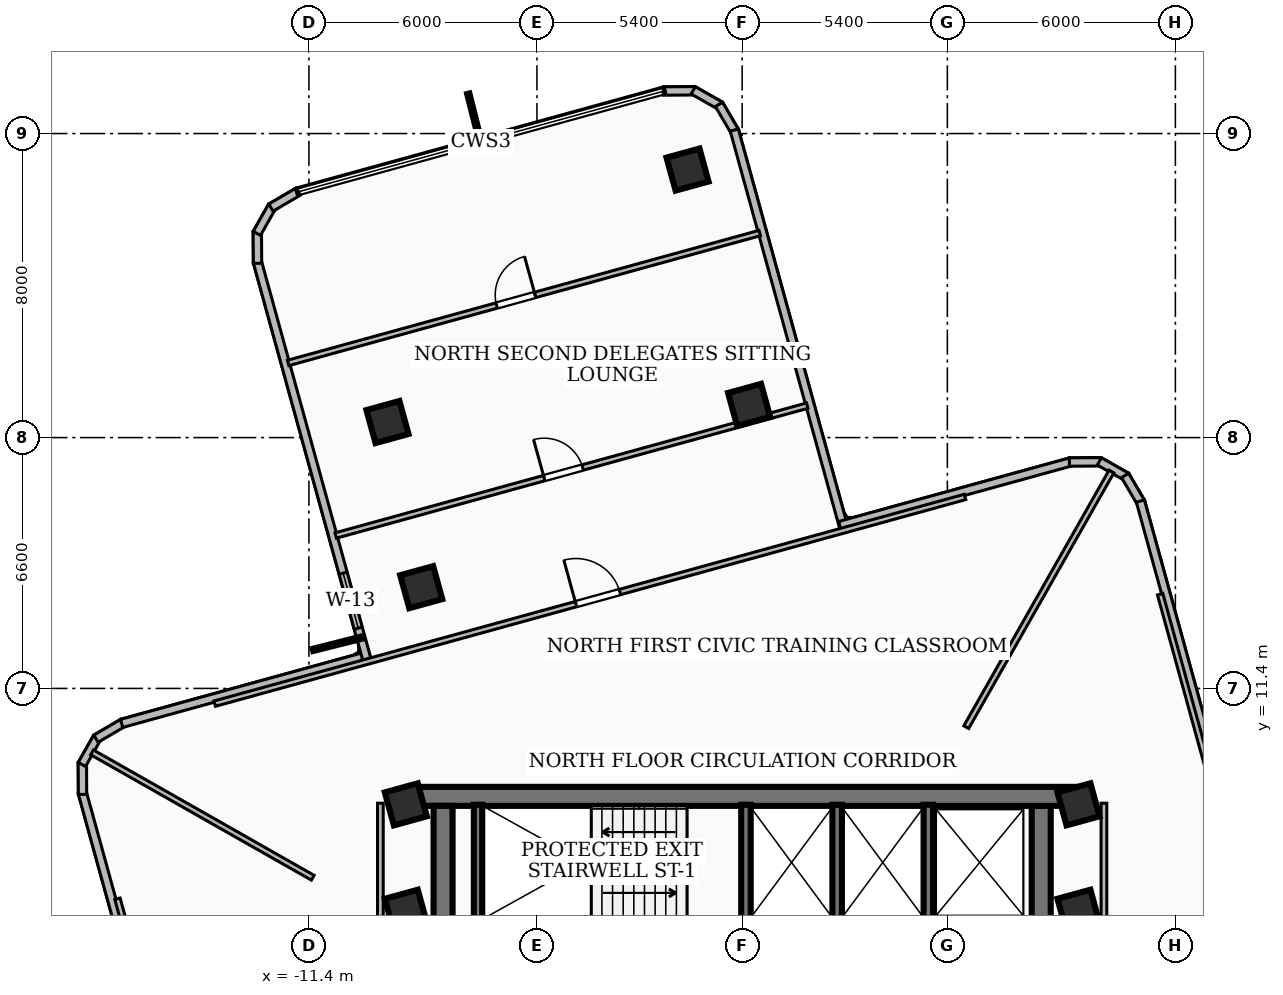
"""IFC4 building model, lengths in metres.
Left out: names, types, materials, properties, quantities, classifications, styles, units other than length and angle.
Written with IfcOpenShell. Run it as: python <this file> out.ifc"""

import sys

from ifc_helpers import new_model, si_unit, direction, frame, frame_2d, origin, origin_2d, place, context, subcontext, project, spatial, rectangle, extrude, element, fill, save


model = new_model("IFC4")
c1 = context("Model", 3, precision=1e-05, world=origin(), true_north=direction((0.0, 1.0)))
c2 = subcontext(c1, "Body", "Model", "MODEL_VIEW")
j1 = project(units=[si_unit("LENGTHUNIT", "METRE"), si_unit("PLANEANGLEUNIT", "RADIAN")], contexts=[c1])
p1 = place(None, origin())
s1 = spatial("IfcSite", under=j1, at=p1, CompositionType="ELEMENT")
p2 = place(p1, origin())
s2 = spatial("IfcBuilding", under=s1, at=p2, CompositionType="ELEMENT")
p3 = place(p2, frame((0.0, 0.0, 134.28)))
s3 = spatial("IfcBuildingStorey", under=s2, at=p3, CompositionType="ELEMENT", Elevation=134.28)
p4 = place(p3, frame((-8.78, 8.56, 0.0), z_axis=(0.0, 0.0, 1.0), x_axis=(1.0, 0.0, 0.0)))
e1 = element("IfcWall", 1, at=p4, inside=s3, PredefinedType="SHEAR", context=c2, shape_type="SweptSolid", body=[
    extrude(rectangle(XDim=17.56, YDim=0.5, at=frame_2d((8.78, 0.0))), origin(), (0.0, 0.0, 1.0), 3.32),
])
for number, where, z_axis, x_axis in (
    (2, (-7.87, 2.0, 0.0), (0.0, 0.0, 1.0), (0.0, 1.0, 0.0)),
    (3, (7.87, 8.31, 0.0), (0.0, 0.0, 1.0), (0.0, -1.0, 0.0)),
):
    element("IfcWall", number, at=place(p3, frame(where, z_axis=z_axis, x_axis=x_axis)), inside=s3, PredefinedType="SHEAR", context=c2, shape_type="SweptSolid", body=[
        extrude(rectangle(XDim=6.31, YDim=0.5, at=frame_2d((3.155, 0.0))), origin(), (0.0, 0.0, 1.0), 3.32),
    ])
p5 = place(p3, frame((-6.95, 5.28, 0.0), z_axis=(0.0, 0.0, 1.0), x_axis=(0.0, 1.0, 0.0)))
e4 = element("IfcWall", 4, at=p5, inside=s3, PredefinedType="SOLIDWALL", context=c2, shape_type="SweptSolid", body=[
    extrude(rectangle(XDim=3.06, YDim=0.22, at=frame_2d((1.53, 0.0))), origin(), (0.0, 0.0, 1.0), 3.32),
])
for number, where, z_axis, x_axis in (
    (5, (0.1, 5.3, 0.0), (0.0, 0.0, 1.0), (0.0, 1.0, 0.0)),
    (6, (2.5, 5.3, 0.0), (0.0, 0.0, 1.0), (0.0, 1.0, 0.0)),
    (7, (4.9, 5.3, 0.0), (0.0, 0.0, 1.0), (0.0, 1.0, 0.0)),
):
    element("IfcWall", number, at=place(p3, frame(where, z_axis=z_axis, x_axis=x_axis)), inside=s3, PredefinedType="SOLIDWALL", context=c2, shape_type="SweptSolid", body=[
        extrude(rectangle(XDim=3.04, YDim=0.25, at=frame_2d((1.52, 0.0))), origin(), (0.0, 0.0, 1.0), 3.32),
    ])
for number, where, z_axis, x_axis in (
    (8, (-8.85, 5.55, 0.0), (0.0, 0.0, 1.0), (0.964, 0.266, 0.0)),
    (9, (8.85, 5.55, 0.0), (0.0, 0.0, 1.0), (0.964, 0.266, 0.0)),
    (10, (-8.85, 8.35, 0.0), (0.0, 0.0, 1.0), (0.964, 0.266, 0.0)),
    (11, (8.85, 8.35, 0.0), (0.0, 0.0, 1.0), (0.964, 0.266, 0.0)),
    (12, (0.183, 18.86, 0.0), (0.0, 0.0, 1.0), (0.964, 0.266, 0.0)),
    (13, (-8.445, 14.064, 0.0), (0.0, 0.0, 1.0), (0.964, 0.266, 0.0)),
    (14, (-1.437, 25.052, 0.0), (0.0, 0.0, 1.0), (0.964, 0.266, 0.0)),
    (15, (-9.333, 18.409, 0.0), (0.0, 0.0, 1.0), (0.964, 0.266, 0.0)),
):
    element("IfcColumn", number, at=place(p3, frame(where, z_axis=z_axis, x_axis=x_axis)), inside=s3, PredefinedType="COLUMN", context=c2, shape_type="SweptSolid", body=[
        extrude(rectangle(XDim=0.9, YDim=0.9, at=origin_2d()), origin(), (0.0, 0.0, 1.0), 3.6),
    ])
p6 = place(p3, frame((-15.686, 2.568, 0.0), z_axis=(0.0, 0.0, 1.0), x_axis=(-0.265558779784, 0.964094670911, 0.0)))
e16 = element("IfcWall", 16, at=p6, inside=s3, PredefinedType="SOLIDWALL", context=c2, shape_type="SweptSolid", body=[
    extrude(rectangle(XDim=6.319, YDim=0.22, at=frame_2d((3.159, 0.0))), origin(), (0.0, 0.0, 1.0), 3.32),
])
p7 = place(p3, frame((-17.357, 8.611, 0.0), z_axis=(0.0, 0.0, 1.0), x_axis=(-0.006140235123, 0.999981148579, 0.0)))
e17 = element("IfcWall", 17, at=p7, inside=s3, PredefinedType="SOLIDWALL", context=c2, shape_type="SweptSolid", body=[
    extrude(rectangle(XDim=0.835, YDim=0.22, at=frame_2d((0.417, 0.0))), origin(), (0.0, 0.0, 1.0), 3.32),
])
p8 = place(p3, frame((-17.374, 9.399, 0.0), z_axis=(0.0, 0.0, 1.0), x_axis=(0.492959963164, 0.87005199541, 0.0)))
e18 = element("IfcWall", 18, at=p8, inside=s3, PredefinedType="SOLIDWALL", context=c2, shape_type="SweptSolid", body=[
    extrude(rectangle(XDim=0.82, YDim=0.22, at=frame_2d((0.41, 0.0))), origin(), (0.0, 0.0, 1.0), 3.32),
])
p9 = place(p3, frame((-17.004, 10.077, 0.0), z_axis=(0.0, 0.0, 1.0), x_axis=(0.862662761192, 0.505779557172, 0.0)))
e19 = element("IfcWall", 19, at=p9, inside=s3, PredefinedType="SOLIDWALL", context=c2, shape_type="SweptSolid", body=[
    extrude(rectangle(XDim=0.834, YDim=0.22, at=frame_2d((0.417, 0.0))), origin(), (0.0, 0.0, 1.0), 3.32),
])
p10 = place(p3, frame((-16.33, 10.479, 0.0), z_axis=(0.0, 0.0, 1.0), x_axis=(0.964092175021, 0.265567840793, 0.0)))
e20 = element("IfcWall", 20, at=p10, inside=s3, PredefinedType="SOLIDWALL", context=c2, shape_type="SweptSolid", body=[
    extrude(rectangle(XDim=6.759, YDim=0.22, at=frame_2d((3.379, 0.0))), origin(), (0.0, 0.0, 1.0), 3.32),
])
p11 = place(p3, frame((-9.876, 12.166, 0.0), z_axis=(0.0, 0.0, 1.0), x_axis=(-0.265506061674, 0.964109190504, 0.0)))
e21 = element("IfcWall", 21, at=p11, inside=s3, PredefinedType="SOLIDWALL", context=c2, shape_type="SweptSolid", body=[
    extrude(rectangle(XDim=10.859, YDim=0.22, at=frame_2d((5.429, 0.0))), origin(), (0.0, 0.0, 1.0), 3.32),
])
p12 = place(p11, frame((0.85, 0.0, 0.85)))
e22 = element("IfcOpeningElement", 22, at=p12, cuts=e21, PredefinedType="OPENING", context=c2, shape_type="SweptSolid", body=[
    extrude(rectangle(XDim=1.5, YDim=1.8, at=frame_2d((0.75, 0.9))), frame((0.0, 0.12, 0.0), z_axis=(0.0, -1.0, 0.0), x_axis=(1.0, 0.0, 0.0)), (0.0, 0.0, 1.0), 0.24),
])
p13 = place(p3, frame((-12.752, 22.586, 0.0), z_axis=(0.0, 0.0, 1.0), x_axis=(-0.007318305188, 0.999973220846, 0.0)))
e23 = element("IfcWall", 23, at=p13, inside=s3, PredefinedType="SOLIDWALL", context=c2, shape_type="SweptSolid", body=[
    extrude(rectangle(XDim=0.834, YDim=0.22, at=frame_2d((0.417, 0.0))), origin(), (0.0, 0.0, 1.0), 3.32),
])
p14 = place(p3, frame((-12.77, 23.373, 0.0), z_axis=(0.0, 0.0, 1.0), x_axis=(0.493087743786, 0.869979584202, 0.0)))
e24 = element("IfcWall", 24, at=p14, inside=s3, PredefinedType="SOLIDWALL", context=c2, shape_type="SweptSolid", body=[
    extrude(rectangle(XDim=0.819, YDim=0.22, at=frame_2d((0.41, 0.0))), origin(), (0.0, 0.0, 1.0), 3.32),
])
p15 = place(p3, frame((-12.4, 24.051, 0.0), z_axis=(0.0, 0.0, 1.0), x_axis=(0.862451814289, 0.506139178517, 0.0)))
e25 = element("IfcWall", 25, at=p15, inside=s3, PredefinedType="SOLIDWALL", context=c2, shape_type="SweptSolid", body=[
    extrude(rectangle(XDim=0.836, YDim=0.22, at=frame_2d((0.418, 0.0))), origin(), (0.0, 0.0, 1.0), 3.32),
])
p16 = place(p3, frame((-2.075, 27.119, 0.0), z_axis=(0.0, 0.0, 1.0), x_axis=(0.999973220846, 0.007318305188, 0.0)))
e26 = element("IfcWall", 26, at=p16, inside=s3, PredefinedType="SOLIDWALL", context=c2, shape_type="SweptSolid", body=[
    extrude(rectangle(XDim=0.834, YDim=0.22, at=frame_2d((0.417, 0.0))), origin(), (0.0, 0.0, 1.0), 3.32),
])
p17 = place(p3, frame((-1.288, 27.137, 0.0), z_axis=(0.0, 0.0, 1.0), x_axis=(0.87005199541, -0.492959963164, 0.0)))
e27 = element("IfcWall", 27, at=p17, inside=s3, PredefinedType="SOLIDWALL", context=c2, shape_type="SweptSolid", body=[
    extrude(rectangle(XDim=0.82, YDim=0.22, at=frame_2d((0.41, 0.0))), origin(), (0.0, 0.0, 1.0), 3.32),
])
p18 = place(p3, frame((-0.61, 26.767, 0.0), z_axis=(0.0, 0.0, 1.0), x_axis=(0.506011715077, -0.862526604926, 0.0)))
e28 = element("IfcWall", 28, at=p18, inside=s3, PredefinedType="SOLIDWALL", context=c2, shape_type="SweptSolid", body=[
    extrude(rectangle(XDim=0.836, YDim=0.22, at=frame_2d((0.418, 0.0))), origin(), (0.0, 0.0, 1.0), 3.32),
])
p19 = place(p3, frame((-0.207, 26.092, 0.0), z_axis=(0.0, 0.0, 1.0), x_axis=(0.265529084478, -0.964102849958, 0.0)))
e29 = element("IfcWall", 29, at=p19, inside=s3, PredefinedType="SOLIDWALL", context=c2, shape_type="SweptSolid", body=[
    extrude(rectangle(XDim=10.858, YDim=0.22, at=frame_2d((5.429, 0.0))), origin(), (0.0, 0.0, 1.0), 2.55),
])
p20 = place(p3, frame((2.568, 15.686, 0.0), z_axis=(0.0, 0.0, 1.0), x_axis=(0.964094670911, 0.265558779784, 0.0)))
e30 = element("IfcWall", 30, at=p20, inside=s3, PredefinedType="SOLIDWALL", context=c2, shape_type="SweptSolid", body=[
    extrude(rectangle(XDim=6.319, YDim=0.22, at=frame_2d((3.159, 0.0))), origin(), (0.0, 0.0, 1.0), 2.55),
])
p21 = place(p3, frame((8.611, 17.357, 0.0), z_axis=(0.0, 0.0, 1.0), x_axis=(0.999981148579, 0.006140235123, 0.0)))
e31 = element("IfcWall", 31, at=p21, inside=s3, PredefinedType="SOLIDWALL", context=c2, shape_type="SweptSolid", body=[
    extrude(rectangle(XDim=0.835, YDim=0.22, at=frame_2d((0.417, 0.0))), origin(), (0.0, 0.0, 1.0), 3.32),
])
p22 = place(p3, frame((9.399, 17.374, 0.0), z_axis=(0.0, 0.0, 1.0), x_axis=(0.87005199541, -0.492959963164, 0.0)))
e32 = element("IfcWall", 32, at=p22, inside=s3, PredefinedType="SOLIDWALL", context=c2, shape_type="SweptSolid", body=[
    extrude(rectangle(XDim=0.82, YDim=0.22, at=frame_2d((0.41, 0.0))), origin(), (0.0, 0.0, 1.0), 3.32),
])
p23 = place(p3, frame((10.077, 17.004, 0.0), z_axis=(0.0, 0.0, 1.0), x_axis=(0.505779557172, -0.862662761192, 0.0)))
e33 = element("IfcWall", 33, at=p23, inside=s3, PredefinedType="SOLIDWALL", context=c2, shape_type="SweptSolid", body=[
    extrude(rectangle(XDim=0.834, YDim=0.22, at=frame_2d((0.417, 0.0))), origin(), (0.0, 0.0, 1.0), 3.32),
])
p24 = place(p3, frame((10.479, 16.33, 0.0), z_axis=(0.0, 0.0, 1.0), x_axis=(0.265567840793, -0.964092175021, 0.0)))
e34 = element("IfcWall", 34, at=p24, inside=s3, PredefinedType="SOLIDWALL", context=c2, shape_type="SweptSolid", body=[
    extrude(rectangle(XDim=6.759, YDim=0.22, at=frame_2d((3.379, 0.0))), origin(), (0.0, 0.0, 1.0), 3.32),
])
p25 = place(p3, frame((12.166, 9.876, 0.0), z_axis=(0.0, 0.0, 1.0), x_axis=(0.964099811745, 0.2655401156, 0.0)))
e35 = element("IfcWall", 35, at=p25, inside=s3, PredefinedType="SOLIDWALL", context=c2, shape_type="SweptSolid", body=[
    extrude(rectangle(XDim=13.459, YDim=0.22, at=frame_2d((6.729, 0.0))), origin(), (0.0, 0.0, 1.0), 3.32),
])
p26 = place(p25, frame((10.259, 0.0, 0.85)))
e36 = element("IfcOpeningElement", 36, at=p26, cuts=e35, PredefinedType="OPENING", context=c2, shape_type="SweptSolid", body=[
    extrude(rectangle(XDim=2.1, YDim=2.0, at=frame_2d((1.05, 1.0))), frame((0.0, 0.12, 0.0), z_axis=(0.0, -1.0, 0.0), x_axis=(1.0, 0.0, 0.0)), (0.0, 0.0, 1.0), 0.24),
])
for number, where, z_axis, x_axis in (
    (37, (-9.52, 1.75, 0.0), (0.0, 0.0, 1.0), (0.0, 1.0, 0.0)),
    (38, (9.52, 1.75, 0.0), (0.0, 0.0, 1.0), (0.0, 1.0, 0.0)),
):
    element("IfcWall", number, at=place(p3, frame(where, z_axis=z_axis, x_axis=x_axis)), inside=s3, PredefinedType="PARTITIONING", context=c2, shape_type="SweptSolid", body=[
        extrude(rectangle(XDim=6.63, YDim=0.15, at=frame_2d((3.315, 0.0))), origin(), (0.0, 0.0, 1.0), 2.55),
    ])
p27 = place(p3, frame((5.897, 10.38, 0.0), z_axis=(0.0, 0.0, 1.0), x_axis=(0.49389771586, 0.869520009125, 0.0)))
e39 = element("IfcWall", 39, at=p27, inside=s3, PredefinedType="PARTITIONING", context=c2, shape_type="SweptSolid", body=[
    extrude(rectangle(XDim=7.737, YDim=0.145, at=frame_2d((3.868, 0.0))), origin(), (0.0, 0.0, 1.0), 2.55),
])
p28 = place(p3, frame((-11.3, 6.419, 0.0), z_axis=(0.0, 0.0, 1.0), x_axis=(-0.869475469758, 0.493976120363, 0.0)))
e40 = element("IfcWall", 40, at=p28, inside=s3, PredefinedType="PARTITIONING", context=c2, shape_type="SweptSolid", body=[
    extrude(rectangle(XDim=6.679, YDim=0.145, at=frame_2d((3.339, 0.0))), origin(), (0.0, 0.0, 1.0), 3.32),
])
p29 = place(p3, frame((10.999, 13.879, 0.0), z_axis=(0.0, 0.0, 1.0), x_axis=(0.26558288107, -0.964088031915, 0.0)))
e41 = element("IfcWall", 41, at=p29, inside=s3, PredefinedType="PARTITIONING", context=c2, shape_type="SweptSolid", body=[
    extrude(rectangle(XDim=20.479, YDim=0.145, at=frame_2d((10.24, 0.0))), origin(), (0.0, 0.0, 1.0), 2.55),
])
p30 = place(p29, frame((9.86, 0.0, 0.0)))
e42 = element("IfcOpeningElement", 42, at=p30, cuts=e41, PredefinedType="OPENING", context=c2, shape_type="SweptSolid", body=[
    extrude(rectangle(XDim=1.2, YDim=2.1, at=frame_2d((0.6, 1.05))), frame((0.0, 0.083, 0.0), z_axis=(0.0, -1.0, 0.0), x_axis=(1.0, 0.0, 0.0)), (0.0, 0.0, 1.0), 0.165),
])
p31 = place(p3, frame((-13.879, 10.999, 0.0), z_axis=(0.0, 0.0, 1.0), x_axis=(0.964088031915, 0.26558288107, 0.0)))
e43 = element("IfcWall", 43, at=p31, inside=s3, PredefinedType="PARTITIONING", context=c2, shape_type="SweptSolid", body=[
    extrude(rectangle(XDim=20.479, YDim=0.145, at=frame_2d((10.24, 0.0))), origin(), (0.0, 0.0, 1.0), 2.55),
])
p32 = place(p31, frame((9.86, 0.0, 0.0)))
e44 = element("IfcOpeningElement", 44, at=p32, cuts=e43, PredefinedType="OPENING", context=c2, shape_type="SweptSolid", body=[
    extrude(rectangle(XDim=1.2, YDim=2.1, at=frame_2d((0.6, 1.05))), frame((0.0, 0.083, 0.0), z_axis=(0.0, -1.0, 0.0), x_axis=(1.0, 0.0, 0.0)), (0.0, 0.0, 1.0), 0.165),
])
p33 = place(p3, frame((-10.695, 15.423, 0.0), z_axis=(0.0, 0.0, 1.0), x_axis=(0.96409048194, 0.265573987115, 0.0)))
e45 = element("IfcWall", 45, at=p33, inside=s3, PredefinedType="PARTITIONING", context=c2, shape_type="SweptSolid", body=[
    extrude(rectangle(XDim=12.87, YDim=0.145, at=frame_2d((6.435, 0.0))), origin(), (0.0, 0.0, 1.0), 2.55),
])
p34 = place(p33, frame((5.69, 0.0, 0.0)))
e46 = element("IfcOpeningElement", 46, at=p34, cuts=e45, PredefinedType="OPENING", context=c2, shape_type="SweptSolid", body=[
    extrude(rectangle(XDim=1.05, YDim=2.08, at=frame_2d((0.525, 1.04))), frame((0.0, 0.083, 0.0), z_axis=(0.0, -1.0, 0.0), x_axis=(1.0, 0.0, 0.0)), (0.0, 0.0, 1.0), 0.165),
])
p35 = place(p3, frame((-11.946, 19.964, 0.0), z_axis=(0.0, 0.0, 1.0), x_axis=(0.96409048194, 0.265573987115, 0.0)))
e47 = element("IfcWall", 47, at=p35, inside=s3, PredefinedType="PARTITIONING", context=c2, shape_type="SweptSolid", body=[
    extrude(rectangle(XDim=12.87, YDim=0.145, at=frame_2d((6.435, 0.0))), origin(), (0.0, 0.0, 1.0), 2.55),
])
p36 = place(p35, frame((5.69, 0.0, 0.0)))
e48 = element("IfcOpeningElement", 48, at=p36, cuts=e47, PredefinedType="OPENING", context=c2, shape_type="SweptSolid", body=[
    extrude(rectangle(XDim=1.05, YDim=2.08, at=frame_2d((0.525, 1.04))), frame((0.0, 0.083, 0.0), z_axis=(0.0, -1.0, 0.0), x_axis=(1.0, 0.0, 0.0)), (0.0, 0.0, 1.0), 0.165),
])
p37 = place(p3, frame((-10.999, -13.879, 0.0), z_axis=(0.0, 0.0, 1.0), x_axis=(-0.26558288107, 0.964088031915, 0.0)))
e49 = element("IfcWall", 49, at=p37, inside=s3, PredefinedType="PARTITIONING", context=c2, shape_type="SweptSolid", body=[
    extrude(rectangle(XDim=20.479, YDim=0.145, at=frame_2d((10.24, 0.0))), origin(), (0.0, 0.0, 1.0), 2.55),
])
p38 = place(p37, frame((9.86, 0.0, 0.0)))
e50 = element("IfcOpeningElement", 50, at=p38, cuts=e49, PredefinedType="OPENING", context=c2, shape_type="SweptSolid", body=[
    extrude(rectangle(XDim=1.2, YDim=2.1, at=frame_2d((0.6, 1.05))), frame((0.0, 0.083, 0.0), z_axis=(0.0, -1.0, 0.0), x_axis=(1.0, 0.0, 0.0)), (0.0, 0.0, 1.0), 0.165),
])
p39 = place(p12, origin())
e51 = element("IfcWindow", 51, at=p39, inside=s3, PartitioningType="SINGLE_PANEL", PredefinedType="WINDOW", context=c2, shape_type="SweptSolid", body=[
    extrude(rectangle(XDim=1.5, YDim=1.8, at=frame_2d((0.75, 0.9))), frame((0.0, 0.03, 0.0), z_axis=(0.0, -1.0, 0.0), x_axis=(1.0, 0.0, 0.0)), (0.0, 0.0, 1.0), 0.06),
])
fill(e22, e51)
p40 = place(p32, origin())
e52 = element("IfcDoor", 52, at=p40, inside=s3, OperationType="SINGLE_SWING_LEFT", PredefinedType="DOOR", context=c2, shape_type="SweptSolid", body=[
    extrude(rectangle(XDim=1.2, YDim=2.1, at=frame_2d((0.6, 1.05))), frame((0.0, 0.025, 0.0), z_axis=(0.0, -1.0, 0.0), x_axis=(1.0, 0.0, 0.0)), (0.0, 0.0, 1.0), 0.05),
])
fill(e44, e52)
p41 = place(p34, origin())
e53 = element("IfcDoor", 53, at=p41, inside=s3, OperationType="SINGLE_SWING_LEFT", PredefinedType="DOOR", context=c2, shape_type="SweptSolid", body=[
    extrude(rectangle(XDim=1.05, YDim=2.08, at=frame_2d((0.525, 1.04))), frame((0.0, 0.025, 0.0), z_axis=(0.0, -1.0, 0.0), x_axis=(1.0, 0.0, 0.0)), (0.0, 0.0, 1.0), 0.05),
])
fill(e46, e53)
p42 = place(p36, origin())
e54 = element("IfcDoor", 54, at=p42, inside=s3, OperationType="SINGLE_SWING_RIGHT", PredefinedType="DOOR", context=c2, shape_type="SweptSolid", body=[
    extrude(rectangle(XDim=1.05, YDim=2.08, at=frame_2d((0.525, 1.04))), frame((0.0, 0.025, 0.0), z_axis=(0.0, -1.0, 0.0), x_axis=(1.0, 0.0, 0.0)), (0.0, 0.0, 1.0), 0.05),
])
fill(e48, e54)
save(model, sys.argv[1])
